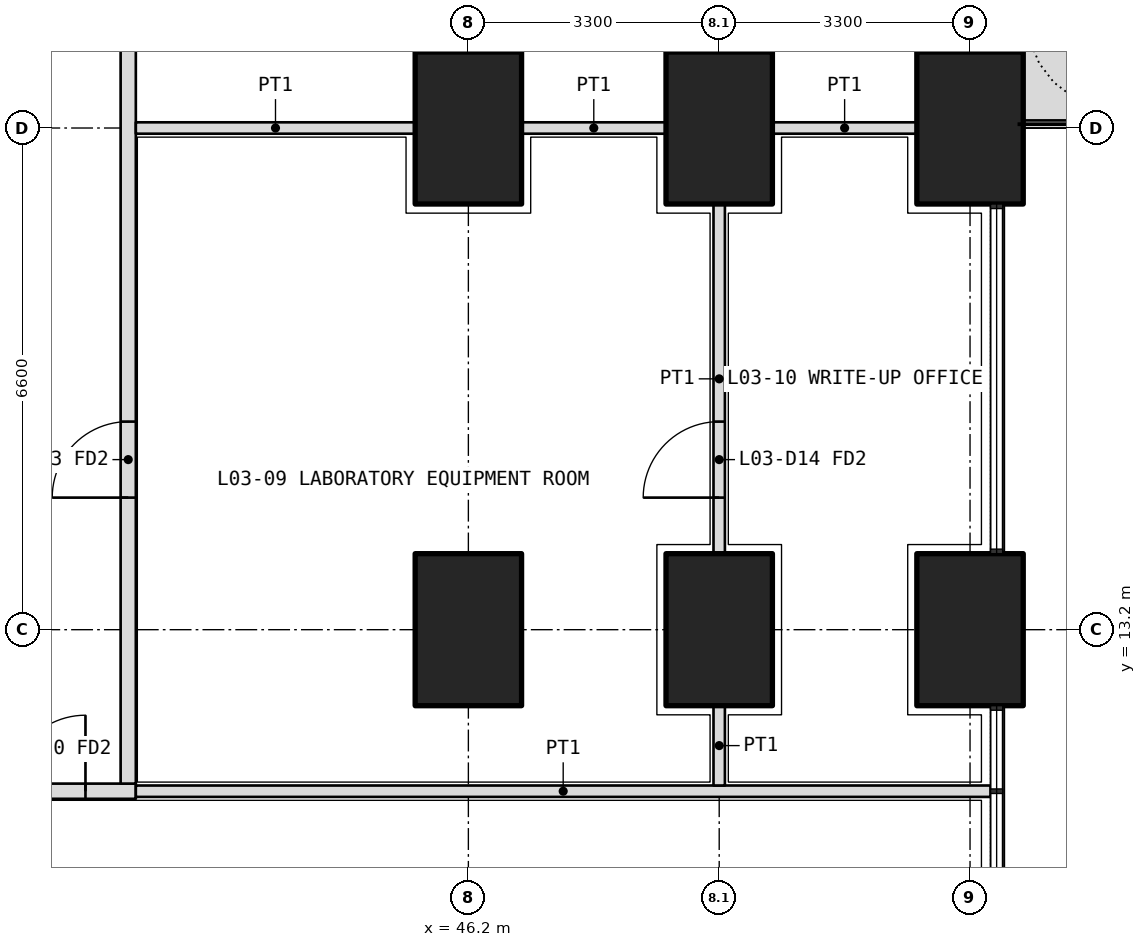
"""IFC4 building model, lengths in metres.
Left out: names, types, materials, properties, quantities, classifications, styles, units other than length and angle.
Written with IfcOpenShell. Run it as: python <this file> out.ifc"""

import sys

from ifc_helpers import new_model, si_unit, direction, frame, frame_2d, origin, origin_2d, place, context, subcontext, project, spatial, polyline, rectangle, outline, extrude, element, fill, save


model = new_model("IFC4")
c1 = context("Model", 3, precision=1e-05, world=origin(), true_north=direction((0.0, 1.0)))
c2 = subcontext(c1, "Body", "Model", "MODEL_VIEW")
j1 = project(units=[si_unit("LENGTHUNIT", "METRE"), si_unit("PLANEANGLEUNIT", "RADIAN")], contexts=[c1])
p1 = place(None, origin())
s1 = spatial("IfcSite", under=j1, at=p1, CompositionType="ELEMENT")
p2 = place(p1, origin())
s2 = spatial("IfcBuilding", under=s1, at=p2, CompositionType="ELEMENT")
p3 = place(p2, frame((0.0, 0.0, 17.1)))
s3 = spatial("IfcBuildingStorey", under=s2, at=p3, CompositionType="ELEMENT", Elevation=17.1)
for number, where, z_axis, x_axis in (
    (1, (52.8, 13.2, 0.0), (0.0, 0.0, 1.0), (0.0, 1.0, 0.0)),
    (2, (52.8, 19.8, 0.0), (0.0, 0.0, 1.0), (0.0, 1.0, 0.0)),
    (3, (49.5, 13.2, 0.0), (0.0, 0.0, 1.0), (0.0, 1.0, 0.0)),
    (4, (49.5, 19.8, 0.0), (0.0, 0.0, 1.0), (0.0, 1.0, 0.0)),
    (5, (46.2, 13.2, 0.0), (0.0, 0.0, 1.0), (0.0, 1.0, 0.0)),
    (6, (46.2, 19.8, 0.0), (0.0, 0.0, 1.0), (0.0, 1.0, 0.0)),
):
    element("IfcColumn", number, at=place(p3, frame(where, z_axis=z_axis, x_axis=x_axis)), inside=s3, PredefinedType="COLUMN", context=c2, shape_type="SweptSolid", body=[
        extrude(rectangle(XDim=2.0, YDim=1.4, at=origin_2d()), origin(), (0.0, 0.0, 1.0), 4.2),
    ])
p4 = place(p3, origin())
e7 = element("IfcWall", 7, at=p4, inside=s3, PredefinedType="USERDEFINED", context=c2, shape_type="SweptSolid", body=[
    extrude(outline(polyline([(53.35, 19.9), (54.35, 19.9), (54.35, 22.35), (53.35, 22.35), (53.35, 19.9)]), holes=[polyline([(53.5, 20.05), (54.2, 20.05), (54.2, 22.2), (53.5, 22.2), (53.5, 20.05)])]), origin(), (0.0, 0.0, 1.0), 1.05),
])
p5 = place(p3, frame((53.15, 20.8, 0.0), z_axis=(0.0, 0.0, 1.0), x_axis=(0.0, 1.0, 0.0)))
e8 = element("IfcWall", 8, at=p5, inside=s3, PredefinedType="SOLIDWALL", context=c2, shape_type="SweptSolid", body=[
    extrude(rectangle(XDim=4.6, YDim=0.15, at=frame_2d((2.3, 0.0))), origin(), (0.0, 0.0, 1.0), 2.7),
])
p6 = place(p5, frame((2.55, 0.0, 0.0)))
e9 = element("IfcOpeningElement", 9, at=p6, cuts=e8, PredefinedType="OPENING", context=c2, shape_type="SweptSolid", body=[
    extrude(rectangle(XDim=1.0, YDim=2.4, at=frame_2d((0.5, 1.2))), frame((0.0, 0.085, 0.0), z_axis=(0.0, -1.0, 0.0), x_axis=(1.0, 0.0, 0.0)), (0.0, 0.0, 1.0), 0.17),
])
p7 = place(p5, frame((0.1, 0.0, 0.1)))
e10 = element("IfcOpeningElement", 10, at=p7, cuts=e8, PredefinedType="OPENING", context=c2, shape_type="SweptSolid", body=[
    extrude(rectangle(XDim=1.95, YDim=2.3, at=frame_2d((0.975, 1.15))), frame((0.0, 0.085, 0.0), z_axis=(0.0, -1.0, 0.0), x_axis=(1.0, 0.0, 0.0)), (0.0, 0.0, 1.0), 0.17),
])
p8 = place(p5, frame((3.65, 0.0, 0.1)))
e11 = element("IfcOpeningElement", 11, at=p8, cuts=e8, PredefinedType="OPENING", context=c2, shape_type="SweptSolid", body=[
    extrude(rectangle(XDim=0.85, YDim=2.3, at=frame_2d((0.425, 1.15))), frame((0.0, 0.085, 0.0), z_axis=(0.0, -1.0, 0.0), x_axis=(1.0, 0.0, 0.0)), (0.0, 0.0, 1.0), 0.17),
])
p9 = place(p3, frame((33.0, 11.075, 0.0), z_axis=(0.0, 0.0, 1.0), x_axis=(1.0, 0.0, 0.0)))
e12 = element("IfcWall", 12, at=p9, inside=s3, PredefinedType="PARTITIONING", context=c2, shape_type="SweptSolid", body=[
    extrude(rectangle(XDim=8.825, YDim=0.2, at=frame_2d((4.413, 0.0))), origin(), (0.0, 0.0, 1.0), 2.85),
])
p10 = place(p9, frame((1.6, 0.0, 0.0)))
e13 = element("IfcOpeningElement", 13, at=p10, cuts=e12, PredefinedType="OPENING", context=c2, shape_type="SweptSolid", body=[
    extrude(rectangle(XDim=1.0, YDim=2.1, at=frame_2d((0.5, 1.05))), frame((0.0, 0.11, 0.0), z_axis=(0.0, -1.0, 0.0), x_axis=(1.0, 0.0, 0.0)), (0.0, 0.0, 1.0), 0.22),
])
p11 = place(p9, frame((4.9, 0.0, 0.0)))
e14 = element("IfcOpeningElement", 14, at=p11, cuts=e12, PredefinedType="OPENING", context=c2, shape_type="SweptSolid", body=[
    extrude(rectangle(XDim=1.0, YDim=2.1, at=frame_2d((0.5, 1.05))), frame((0.0, 0.11, 0.0), z_axis=(0.0, -1.0, 0.0), x_axis=(1.0, 0.0, 0.0)), (0.0, 0.0, 1.0), 0.22),
])
p12 = place(p9, frame((7.163, 0.0, 0.0)))
e15 = element("IfcOpeningElement", 15, at=p12, cuts=e12, PredefinedType="OPENING", context=c2, shape_type="SweptSolid", body=[
    extrude(rectangle(XDim=1.0, YDim=2.1, at=frame_2d((0.5, 1.05))), frame((0.0, 0.11, 0.0), z_axis=(0.0, -1.0, 0.0), x_axis=(1.0, 0.0, 0.0)), (0.0, 0.0, 1.0), 0.22),
])
p13 = place(p3, frame((41.725, 11.175, 0.0), z_axis=(0.0, 0.0, 1.0), x_axis=(0.0, 1.0, 0.0)))
e16 = element("IfcWall", 16, at=p13, inside=s3, PredefinedType="PARTITIONING", context=c2, shape_type="SweptSolid", body=[
    extrude(rectangle(XDim=23.85, YDim=0.2, at=frame_2d((11.925, 0.0))), origin(), (0.0, 0.0, 1.0), 2.85),
])
p14 = place(p13, frame((3.762, 0.0, 0.0)))
e17 = element("IfcOpeningElement", 17, at=p14, cuts=e16, PredefinedType="OPENING", context=c2, shape_type="SweptSolid", body=[
    extrude(rectangle(XDim=1.0, YDim=2.1, at=frame_2d((0.5, 1.05))), frame((0.0, 0.11, 0.0), z_axis=(0.0, -1.0, 0.0), x_axis=(1.0, 0.0, 0.0)), (0.0, 0.0, 1.0), 0.22),
])
p15 = place(p13, frame((9.725, 0.0, 0.0)))
e18 = element("IfcOpeningElement", 18, at=p15, cuts=e16, PredefinedType="OPENING", context=c2, shape_type="SweptSolid", body=[
    extrude(rectangle(XDim=1.0, YDim=2.1, at=frame_2d((0.5, 1.05))), frame((0.0, 0.11, 0.0), z_axis=(0.0, -1.0, 0.0), x_axis=(1.0, 0.0, 0.0)), (0.0, 0.0, 1.0), 0.22),
])
p16 = place(p13, frame((13.075, 0.0, 0.0)))
e19 = element("IfcOpeningElement", 19, at=p16, cuts=e16, PredefinedType="OPENING", context=c2, shape_type="SweptSolid", body=[
    extrude(rectangle(XDim=0.9, YDim=2.1, at=frame_2d((0.45, 1.05))), frame((0.0, 0.11, 0.0), z_axis=(0.0, -1.0, 0.0), x_axis=(1.0, 0.0, 0.0)), (0.0, 0.0, 1.0), 0.22),
])
p17 = place(p13, frame((18.988, 0.0, 0.0)))
e20 = element("IfcOpeningElement", 20, at=p17, cuts=e16, PredefinedType="OPENING", context=c2, shape_type="SweptSolid", body=[
    extrude(rectangle(XDim=1.2, YDim=2.1, at=frame_2d((0.6, 1.05))), frame((0.0, 0.11, 0.0), z_axis=(0.0, -1.0, 0.0), x_axis=(1.0, 0.0, 0.0)), (0.0, 0.0, 1.0), 0.22),
])
p18 = place(p3, frame((53.07, 11.075, 0.0), z_axis=(0.0, 0.0, 1.0), x_axis=(-1.0, 0.0, 0.0)))
e21 = element("IfcWall", 21, at=p18, inside=s3, PredefinedType="PARTITIONING", context=c2, shape_type="SweptSolid", body=[
    extrude(rectangle(XDim=11.245, YDim=0.15, at=frame_2d((5.623, 0.0))), origin(), (0.0, 0.0, 1.0), 2.7),
])
p19 = place(p3, frame((49.5, 11.15, 0.0), z_axis=(0.0, 0.0, 1.0), x_axis=(0.0, 1.0, 0.0)))
e22 = element("IfcWall", 22, at=p19, inside=s3, PredefinedType="PARTITIONING", context=c2, shape_type="SweptSolid", body=[
    extrude(rectangle(XDim=1.05, YDim=0.15, at=frame_2d((0.525, 0.0))), origin(), (0.0, 0.0, 1.0), 3.9),
])
p20 = place(p3, frame((49.5, 14.2, 0.0), z_axis=(0.0, 0.0, 1.0), x_axis=(0.0, 1.0, 0.0)))
e23 = element("IfcWall", 23, at=p20, inside=s3, PredefinedType="PARTITIONING", context=c2, shape_type="SweptSolid", body=[
    extrude(rectangle(XDim=4.6, YDim=0.15, at=frame_2d((2.3, 0.0))), origin(), (0.0, 0.0, 1.0), 3.9),
])
p21 = place(p20, frame((0.738, 0.0, 0.0)))
e24 = element("IfcOpeningElement", 24, at=p21, cuts=e23, PredefinedType="OPENING", context=c2, shape_type="SweptSolid", body=[
    extrude(rectangle(XDim=1.0, YDim=2.1, at=frame_2d((0.5, 1.05))), frame((0.0, 0.085, 0.0), z_axis=(0.0, -1.0, 0.0), x_axis=(1.0, 0.0, 0.0)), (0.0, 0.0, 1.0), 0.17),
])
for number, where, z_axis, x_axis in (
    (25, (52.1, 19.8, 0.0), (0.0, 0.0, 1.0), (-1.0, 0.0, 0.0)),
    (26, (48.8, 19.8, 0.0), (0.0, 0.0, 1.0), (-1.0, 0.0, 0.0)),
):
    element("IfcWall", number, at=place(p3, frame(where, z_axis=z_axis, x_axis=x_axis)), inside=s3, PredefinedType="PARTITIONING", context=c2, shape_type="SweptSolid", body=[
        extrude(rectangle(XDim=1.9, YDim=0.15, at=frame_2d((0.95, 0.0))), origin(), (0.0, 0.0, 1.0), 2.85),
    ])
p22 = place(p3, frame((45.5, 19.8, 0.0), z_axis=(0.0, 0.0, 1.0), x_axis=(-1.0, 0.0, 0.0)))
e27 = element("IfcWall", 27, at=p22, inside=s3, PredefinedType="PARTITIONING", context=c2, shape_type="SweptSolid", body=[
    extrude(rectangle(XDim=3.675, YDim=0.15, at=frame_2d((1.837, 0.0))), origin(), (0.0, 0.0, 1.0), 2.85),
])
p23 = place(p12, origin())
e28 = element("IfcDoor", 28, at=p23, inside=s3, OperationType="SINGLE_SWING_RIGHT", PredefinedType="DOOR", context=c2, shape_type="SweptSolid", body=[
    extrude(rectangle(XDim=1.0, YDim=2.1, at=frame_2d((0.5, 1.05))), frame((0.0, 0.025, 0.0), z_axis=(0.0, -1.0, 0.0), x_axis=(1.0, 0.0, 0.0)), (0.0, 0.0, 1.0), 0.05),
])
fill(e15, e28)
p24 = place(p14, origin())
e29 = element("IfcDoor", 29, at=p24, inside=s3, OperationType="SINGLE_SWING_LEFT", PredefinedType="DOOR", context=c2, shape_type="SweptSolid", body=[
    extrude(rectangle(XDim=1.0, YDim=2.1, at=frame_2d((0.5, 1.05))), frame((0.0, 0.025, 0.0), z_axis=(0.0, -1.0, 0.0), x_axis=(1.0, 0.0, 0.0)), (0.0, 0.0, 1.0), 0.05),
])
fill(e17, e29)
p25 = place(p21, origin())
e30 = element("IfcDoor", 30, at=p25, inside=s3, OperationType="SINGLE_SWING_LEFT", PredefinedType="DOOR", context=c2, shape_type="SweptSolid", body=[
    extrude(rectangle(XDim=1.0, YDim=2.1, at=frame_2d((0.5, 1.05))), frame((0.0, 0.025, 0.0), z_axis=(0.0, -1.0, 0.0), x_axis=(1.0, 0.0, 0.0)), (0.0, 0.0, 1.0), 0.05),
])
fill(e24, e30)
save(model, sys.argv[1])
